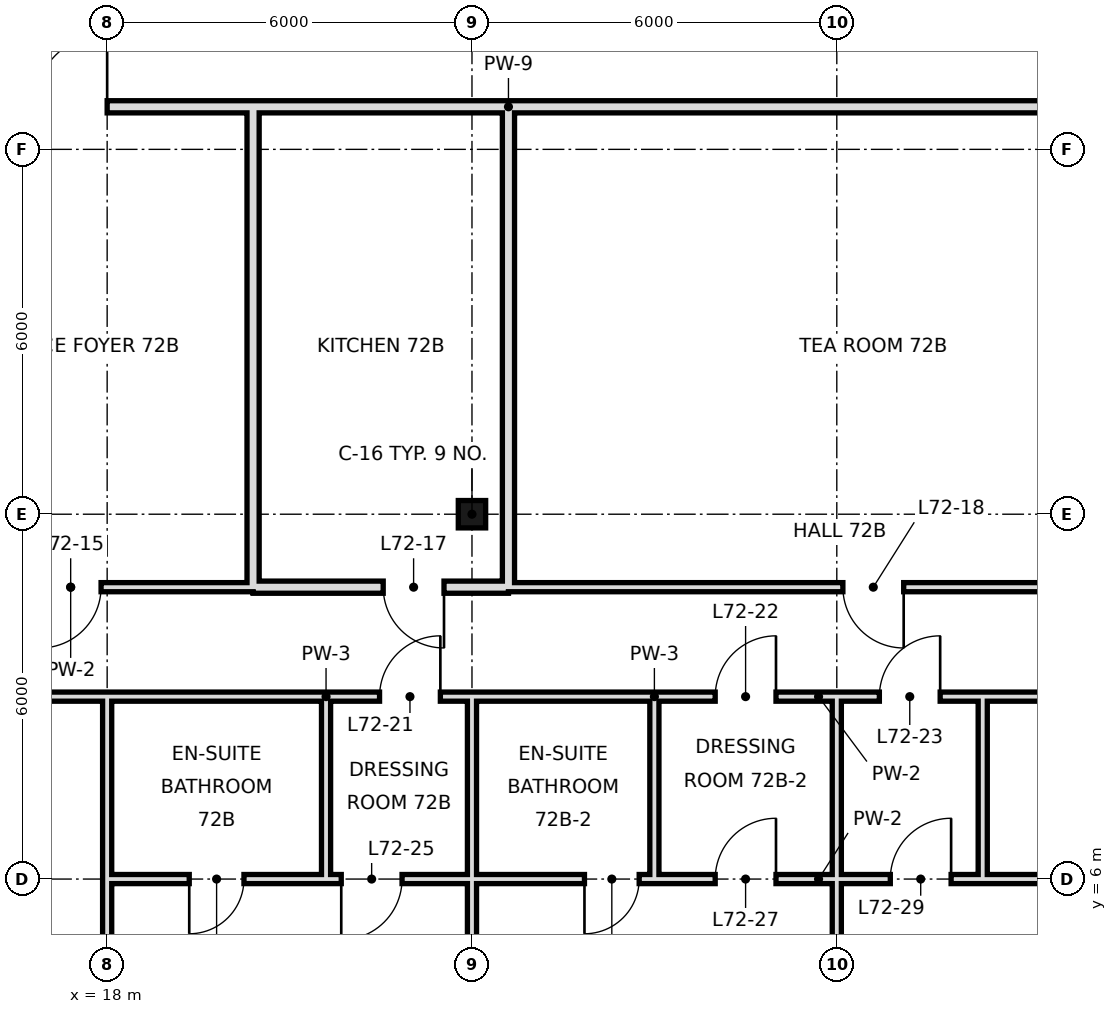
"""IFC4 building model, lengths in metres.
Left out: names, types, materials, properties, quantities, classifications, styles, units other than length and angle.
Written with IfcOpenShell. Run it as: python <this file> out.ifc"""

import sys

from ifc_helpers import new_model, si_unit, direction, frame, frame_2d, origin, origin_2d, place, context, subcontext, project, spatial, rectangle, hollow_rectangle, extrude, element, fill, save


model = new_model("IFC4")
c1 = context("Model", 3, precision=1e-05, world=origin(), true_north=direction((0.0, 1.0)))
c2 = subcontext(c1, "Body", "Model", "MODEL_VIEW")
j1 = project(units=[si_unit("LENGTHUNIT", "METRE"), si_unit("PLANEANGLEUNIT", "RADIAN")], contexts=[c1])
p1 = place(None, origin())
s1 = spatial("IfcSite", under=j1, at=p1, CompositionType="ELEMENT")
p2 = place(p1, origin())
s2 = spatial("IfcBuilding", under=s1, at=p2, CompositionType="ELEMENT")
p3 = place(p2, frame((0.0, 0.0, 305.2)))
s3 = spatial("IfcBuildingStorey", under=s2, at=p3, CompositionType="ELEMENT", Elevation=305.2)
p4 = place(p3, frame((24.0, 12.0, 0.0), z_axis=(0.0, 0.0, 1.0), x_axis=(1.0, 0.0, 0.0)))
e1 = element("IfcColumn", 1, at=p4, inside=s3, PredefinedType="COLUMN", context=c2, shape_type="SweptSolid", body=[
    extrude(hollow_rectangle(XDim=0.45, YDim=0.45, WallThickness=0.022, at=origin_2d()), origin(), (0.0, 0.0, 1.0), 3.6),
])
p5 = place(p3, frame((18.0, -0.6, 0.0), z_axis=(0.0, 0.0, 1.0), x_axis=(0.0, 1.0, 0.0)))
e2 = element("IfcWall", 2, at=p5, inside=s3, PredefinedType="PARTITIONING", context=c2, shape_type="SweptSolid", body=[
    extrude(rectangle(XDim=6.6, YDim=0.15, at=frame_2d((3.3, 0.0))), origin(), (0.0, 0.0, 1.0), 2.72),
])
p6 = place(p3, frame((18.0, 6.0, 0.0), z_axis=(0.0, 0.0, 1.0), x_axis=(0.0, 1.0, 0.0)))
e3 = element("IfcWall", 3, at=p6, inside=s3, PredefinedType="PARTITIONING", context=c2, shape_type="SweptSolid", body=[
    extrude(rectangle(XDim=3.0, YDim=0.15, at=frame_2d((1.5, 0.0))), origin(), (0.0, 0.0, 1.0), 2.72),
])
p7 = place(p3, frame((20.4, 10.8, 0.0), z_axis=(0.0, 0.0, 1.0), x_axis=(0.0, 1.0, 0.0)))
e4 = element("IfcWall", 4, at=p7, inside=s3, PredefinedType="SOLIDWALL", context=c2, shape_type="SweptSolid", body=[
    extrude(rectangle(XDim=7.9, YDim=0.2, at=frame_2d((3.95, 0.0))), origin(), (0.0, 0.0, 1.0), 2.72),
])
p8 = place(p3, frame((21.6, 6.0, 0.0), z_axis=(0.0, 0.0, 1.0), x_axis=(0.0, 1.0, 0.0)))
e5 = element("IfcWall", 5, at=p8, inside=s3, PredefinedType="PARTITIONING", context=c2, shape_type="SweptSolid", body=[
    extrude(rectangle(XDim=3.0, YDim=0.15, at=frame_2d((1.5, 0.0))), origin(), (0.0, 0.0, 1.0), 3.42),
])
p9 = place(p3, frame((24.0, 0.0, 0.0), z_axis=(0.0, 0.0, 1.0), x_axis=(0.0, 1.0, 0.0)))
e6 = element("IfcWall", 6, at=p9, inside=s3, PredefinedType="PARTITIONING", context=c2, shape_type="SweptSolid", body=[
    extrude(rectangle(XDim=6.0, YDim=0.15, at=frame_2d((3.0, 0.0))), origin(), (0.0, 0.0, 1.0), 2.72),
])
p10 = place(p3, frame((24.0, 6.0, 0.0), z_axis=(0.0, 0.0, 1.0), x_axis=(0.0, 1.0, 0.0)))
e7 = element("IfcWall", 7, at=p10, inside=s3, PredefinedType="PARTITIONING", context=c2, shape_type="SweptSolid", body=[
    extrude(rectangle(XDim=3.0, YDim=0.15, at=frame_2d((1.5, 0.0))), origin(), (0.0, 0.0, 1.0), 2.72),
])
p11 = place(p3, frame((24.6, 10.8, 0.0), z_axis=(0.0, 0.0, 1.0), x_axis=(0.0, 1.0, 0.0)))
e8 = element("IfcWall", 8, at=p11, inside=s3, PredefinedType="SOLIDWALL", context=c2, shape_type="SweptSolid", body=[
    extrude(rectangle(XDim=7.9, YDim=0.2, at=frame_2d((3.95, 0.0))), origin(), (0.0, 0.0, 1.0), 2.72),
])
p12 = place(p3, frame((27.0, 6.0, 0.0), z_axis=(0.0, 0.0, 1.0), x_axis=(0.0, 1.0, 0.0)))
e9 = element("IfcWall", 9, at=p12, inside=s3, PredefinedType="PARTITIONING", context=c2, shape_type="SweptSolid", body=[
    extrude(rectangle(XDim=3.0, YDim=0.15, at=frame_2d((1.5, 0.0))), origin(), (0.0, 0.0, 1.0), 3.42),
])
p13 = place(p3, frame((30.0, -0.6, 0.0), z_axis=(0.0, 0.0, 1.0), x_axis=(0.0, 1.0, 0.0)))
e10 = element("IfcWall", 10, at=p13, inside=s3, PredefinedType="PARTITIONING", context=c2, shape_type="SweptSolid", body=[
    extrude(rectangle(XDim=9.6, YDim=0.15, at=frame_2d((4.8, 0.0))), origin(), (0.0, 0.0, 1.0), 2.72),
])
p14 = place(p3, frame((32.4, 6.0, 0.0), z_axis=(0.0, 0.0, 1.0), x_axis=(0.0, 1.0, 0.0)))
e11 = element("IfcWall", 11, at=p14, inside=s3, PredefinedType="PARTITIONING", context=c2, shape_type="SweptSolid", body=[
    extrude(rectangle(XDim=3.0, YDim=0.15, at=frame_2d((1.5, 0.0))), origin(), (0.0, 0.0, 1.0), 3.42),
])
p15 = place(p3, frame((20.4, 10.8, 0.0), z_axis=(0.0, 0.0, 1.0), x_axis=(1.0, 0.0, 0.0)))
e12 = element("IfcWall", 12, at=p15, inside=s3, PredefinedType="SOLIDWALL", context=c2, shape_type="SweptSolid", body=[
    extrude(rectangle(XDim=4.2, YDim=0.2, at=frame_2d((2.1, 0.0))), origin(), (0.0, 0.0, 1.0), 2.72),
])
p16 = place(p15, frame((2.14, 0.0, 0.0)))
e13 = element("IfcOpeningElement", 13, at=p16, cuts=e12, PredefinedType="OPENING", context=c2, shape_type="SweptSolid", body=[
    extrude(rectangle(XDim=1.0, YDim=2.4, at=frame_2d((0.5, 1.2))), frame((0.0, 0.11, 0.0), z_axis=(0.0, -1.0, 0.0), x_axis=(1.0, 0.0, 0.0)), (0.0, 0.0, 1.0), 0.22),
])
p17 = place(p3, frame((14.4, 10.8, 0.0), z_axis=(0.0, 0.0, 1.0), x_axis=(1.0, 0.0, 0.0)))
e14 = element("IfcWall", 14, at=p17, inside=s3, PredefinedType="PARTITIONING", context=c2, shape_type="SweptSolid", body=[
    extrude(rectangle(XDim=6.0, YDim=0.15, at=frame_2d((3.0, 0.0))), origin(), (0.0, 0.0, 1.0), 3.42),
])
p18 = place(p17, frame((2.5, 0.0, 0.0)))
e15 = element("IfcOpeningElement", 15, at=p18, cuts=e14, PredefinedType="OPENING", context=c2, shape_type="SweptSolid", body=[
    extrude(rectangle(XDim=1.0, YDim=2.4, at=frame_2d((0.5, 1.2))), frame((0.0, 0.085, 0.0), z_axis=(0.0, -1.0, 0.0), x_axis=(1.0, 0.0, 0.0)), (0.0, 0.0, 1.0), 0.17),
])
p19 = place(p3, frame((24.6, 10.8, 0.0), z_axis=(0.0, 0.0, 1.0), x_axis=(1.0, 0.0, 0.0)))
e16 = element("IfcWall", 16, at=p19, inside=s3, PredefinedType="PARTITIONING", context=c2, shape_type="SweptSolid", body=[
    extrude(rectangle(XDim=24.0, YDim=0.15, at=frame_2d((12.0, 0.0))), origin(), (0.0, 0.0, 1.0), 3.42),
])
p20 = place(p19, frame((5.5, 0.0, 0.0)))
e17 = element("IfcOpeningElement", 17, at=p20, cuts=e16, PredefinedType="OPENING", context=c2, shape_type="SweptSolid", body=[
    extrude(rectangle(XDim=1.0, YDim=2.4, at=frame_2d((0.5, 1.2))), frame((0.0, 0.085, 0.0), z_axis=(0.0, -1.0, 0.0), x_axis=(1.0, 0.0, 0.0)), (0.0, 0.0, 1.0), 0.17),
])
p21 = place(p19, frame((15.22, 0.0, 0.0)))
e18 = element("IfcOpeningElement", 18, at=p21, cuts=e16, PredefinedType="OPENING", context=c2, shape_type="SweptSolid", body=[
    extrude(rectangle(XDim=1.0, YDim=2.4, at=frame_2d((0.5, 1.2))), frame((0.0, 0.085, 0.0), z_axis=(0.0, -1.0, 0.0), x_axis=(1.0, 0.0, 0.0)), (0.0, 0.0, 1.0), 0.17),
])
p22 = place(p3, frame((3.1, 18.7, 0.0), z_axis=(0.0, 0.0, 1.0), x_axis=(1.0, 0.0, 0.0)))
e19 = element("IfcWall", 19, at=p22, inside=s3, PredefinedType="SOLIDWALL", context=c2, shape_type="SweptSolid", body=[
    extrude(rectangle(XDim=17.3, YDim=0.2, at=frame_2d((8.65, 0.0))), origin(), (0.0, 0.0, 1.0), 2.72),
])
p23 = place(p22, frame((6.12, 0.0, 0.0)))
e20 = element("IfcOpeningElement", 20, at=p23, cuts=e19, PredefinedType="OPENING", context=c2, shape_type="SweptSolid", body=[
    extrude(rectangle(XDim=1.2, YDim=2.4, at=frame_2d((0.6, 1.2))), frame((0.0, 0.11, 0.0), z_axis=(0.0, -1.0, 0.0), x_axis=(1.0, 0.0, 0.0)), (0.0, 0.0, 1.0), 0.22),
])
p24 = place(p22, frame((13.7, 0.0, 0.0)))
e21 = element("IfcOpeningElement", 21, at=p24, cuts=e19, PredefinedType="OPENING", context=c2, shape_type="SweptSolid", body=[
    extrude(rectangle(XDim=1.2, YDim=2.4, at=frame_2d((0.6, 1.2))), frame((0.0, 0.11, 0.0), z_axis=(0.0, -1.0, 0.0), x_axis=(1.0, 0.0, 0.0)), (0.0, 0.0, 1.0), 0.22),
])
p25 = place(p3, frame((24.6, 18.7, 0.0), z_axis=(0.0, 0.0, 1.0), x_axis=(1.0, 0.0, 0.0)))
e22 = element("IfcWall", 22, at=p25, inside=s3, PredefinedType="SOLIDWALL", context=c2, shape_type="SweptSolid", body=[
    extrude(rectangle(XDim=20.3, YDim=0.2, at=frame_2d((10.15, 0.0))), origin(), (0.0, 0.0, 1.0), 2.72),
])
p26 = place(p3, frame((20.4, 18.7, 0.0), z_axis=(0.0, 0.0, 1.0), x_axis=(1.0, 0.0, 0.0)))
e23 = element("IfcWall", 23, at=p26, inside=s3, PredefinedType="SOLIDWALL", context=c2, shape_type="SweptSolid", body=[
    extrude(rectangle(XDim=4.2, YDim=0.2, at=frame_2d((2.1, 0.0))), origin(), (0.0, 0.0, 1.0), 3.42),
])
p27 = place(p3, frame((21.6, 6.0, 0.0), z_axis=(0.0, 0.0, 1.0), x_axis=(1.0, 0.0, 0.0)))
e24 = element("IfcWall", 24, at=p27, inside=s3, PredefinedType="PARTITIONING", context=c2, shape_type="SweptSolid", body=[
    extrude(rectangle(XDim=2.4, YDim=0.15, at=frame_2d((1.2, 0.0))), origin(), (0.0, 0.0, 1.0), 2.97),
])
p28 = place(p27, frame((0.25, 0.0, 0.0)))
e25 = element("IfcOpeningElement", 25, at=p28, cuts=e24, PredefinedType="OPENING", context=c2, shape_type="SweptSolid", body=[
    extrude(rectangle(XDim=1.0, YDim=2.4, at=frame_2d((0.5, 1.2))), frame((0.0, 0.085, 0.0), z_axis=(0.0, -1.0, 0.0), x_axis=(1.0, 0.0, 0.0)), (0.0, 0.0, 1.0), 0.17),
])
p29 = place(p3, frame((27.0, 6.0, 0.0), z_axis=(0.0, 0.0, 1.0), x_axis=(1.0, 0.0, 0.0)))
e26 = element("IfcWall", 26, at=p29, inside=s3, PredefinedType="PARTITIONING", context=c2, shape_type="SweptSolid", body=[
    extrude(rectangle(XDim=5.4, YDim=0.15, at=frame_2d((2.7, 0.0))), origin(), (0.0, 0.0, 1.0), 2.97),
])
p30 = place(p29, frame((1.0, 0.0, 0.0)))
e27 = element("IfcOpeningElement", 27, at=p30, cuts=e26, PredefinedType="OPENING", context=c2, shape_type="SweptSolid", body=[
    extrude(rectangle(XDim=1.0, YDim=2.4, at=frame_2d((0.5, 1.2))), frame((0.0, 0.085, 0.0), z_axis=(0.0, -1.0, 0.0), x_axis=(1.0, 0.0, 0.0)), (0.0, 0.0, 1.0), 0.17),
])
p31 = place(p29, frame((3.88, 0.0, 0.0)))
e28 = element("IfcOpeningElement", 28, at=p31, cuts=e26, PredefinedType="OPENING", context=c2, shape_type="SweptSolid", body=[
    extrude(rectangle(XDim=1.0, YDim=2.4, at=frame_2d((0.5, 1.2))), frame((0.0, 0.085, 0.0), z_axis=(0.0, -1.0, 0.0), x_axis=(1.0, 0.0, 0.0)), (0.0, 0.0, 1.0), 0.17),
])
p32 = place(p3, frame((18.0, 6.0, 0.0), z_axis=(0.0, 0.0, 1.0), x_axis=(1.0, 0.0, 0.0)))
e29 = element("IfcWall", 29, at=p32, inside=s3, PredefinedType="PARTITIONING", context=c2, shape_type="SweptSolid", body=[
    extrude(rectangle(XDim=3.6, YDim=0.15, at=frame_2d((1.8, 0.0))), origin(), (0.0, 0.0, 1.0), 2.97),
])
p33 = place(p32, frame((1.35, 0.0, 0.0)))
e30 = element("IfcOpeningElement", 30, at=p33, cuts=e29, PredefinedType="OPENING", context=c2, shape_type="SweptSolid", body=[
    extrude(rectangle(XDim=0.9, YDim=2.4, at=frame_2d((0.45, 1.2))), frame((0.0, 0.085, 0.0), z_axis=(0.0, -1.0, 0.0), x_axis=(1.0, 0.0, 0.0)), (0.0, 0.0, 1.0), 0.17),
])
p34 = place(p3, frame((24.0, 6.0, 0.0), z_axis=(0.0, 0.0, 1.0), x_axis=(1.0, 0.0, 0.0)))
e31 = element("IfcWall", 31, at=p34, inside=s3, PredefinedType="PARTITIONING", context=c2, shape_type="SweptSolid", body=[
    extrude(rectangle(XDim=3.0, YDim=0.15, at=frame_2d((1.5, 0.0))), origin(), (0.0, 0.0, 1.0), 2.97),
])
p35 = place(p34, frame((1.85, 0.0, 0.0)))
e32 = element("IfcOpeningElement", 32, at=p35, cuts=e31, PredefinedType="OPENING", context=c2, shape_type="SweptSolid", body=[
    extrude(rectangle(XDim=0.9, YDim=2.4, at=frame_2d((0.45, 1.2))), frame((0.0, 0.085, 0.0), z_axis=(0.0, -1.0, 0.0), x_axis=(1.0, 0.0, 0.0)), (0.0, 0.0, 1.0), 0.17),
])
p36 = place(p3, frame((32.4, 6.0, 0.0), z_axis=(0.0, 0.0, 1.0), x_axis=(1.0, 0.0, 0.0)))
e33 = element("IfcWall", 33, at=p36, inside=s3, PredefinedType="PARTITIONING", context=c2, shape_type="SweptSolid", body=[
    extrude(rectangle(XDim=3.6, YDim=0.15, at=frame_2d((1.8, 0.0))), origin(), (0.0, 0.0, 1.0), 2.97),
])
p37 = place(p36, frame((1.79, 0.0, 0.0)))
e34 = element("IfcOpeningElement", 34, at=p37, cuts=e33, PredefinedType="OPENING", context=c2, shape_type="SweptSolid", body=[
    extrude(rectangle(XDim=0.9, YDim=2.4, at=frame_2d((0.45, 1.2))), frame((0.0, 0.085, 0.0), z_axis=(0.0, -1.0, 0.0), x_axis=(1.0, 0.0, 0.0)), (0.0, 0.0, 1.0), 0.17),
])
p38 = place(p3, frame((8.4, 9.0, 0.0), z_axis=(0.0, 0.0, 1.0), x_axis=(1.0, 0.0, 0.0)))
e35 = element("IfcWall", 35, at=p38, inside=s3, PredefinedType="PARTITIONING", context=c2, shape_type="SweptSolid", body=[
    extrude(rectangle(XDim=9.6, YDim=0.15, at=frame_2d((4.8, 0.0))), origin(), (0.0, 0.0, 1.0), 3.42),
])
p39 = place(p38, frame((1.72, 0.0, 0.0)))
e36 = element("IfcOpeningElement", 36, at=p39, cuts=e35, PredefinedType="OPENING", context=c2, shape_type="SweptSolid", body=[
    extrude(rectangle(XDim=1.0, YDim=2.4, at=frame_2d((0.5, 1.2))), frame((0.0, 0.085, 0.0), z_axis=(0.0, -1.0, 0.0), x_axis=(1.0, 0.0, 0.0)), (0.0, 0.0, 1.0), 0.17),
])
p40 = place(p38, frame((5.2, 0.0, 0.0)))
e37 = element("IfcOpeningElement", 37, at=p40, cuts=e35, PredefinedType="OPENING", context=c2, shape_type="SweptSolid", body=[
    extrude(rectangle(XDim=1.0, YDim=2.4, at=frame_2d((0.5, 1.2))), frame((0.0, 0.085, 0.0), z_axis=(0.0, -1.0, 0.0), x_axis=(1.0, 0.0, 0.0)), (0.0, 0.0, 1.0), 0.17),
])
p41 = place(p3, frame((21.6, 9.0, 0.0), z_axis=(0.0, 0.0, 1.0), x_axis=(1.0, 0.0, 0.0)))
e38 = element("IfcWall", 38, at=p41, inside=s3, PredefinedType="PARTITIONING", context=c2, shape_type="SweptSolid", body=[
    extrude(rectangle(XDim=2.4, YDim=0.15, at=frame_2d((1.2, 0.0))), origin(), (0.0, 0.0, 1.0), 3.42),
])
p42 = place(p41, frame((0.88, 0.0, 0.0)))
e39 = element("IfcOpeningElement", 39, at=p42, cuts=e38, PredefinedType="OPENING", context=c2, shape_type="SweptSolid", body=[
    extrude(rectangle(XDim=1.0, YDim=2.4, at=frame_2d((0.5, 1.2))), frame((0.0, 0.085, 0.0), z_axis=(0.0, -1.0, 0.0), x_axis=(1.0, 0.0, 0.0)), (0.0, 0.0, 1.0), 0.17),
])
p43 = place(p3, frame((27.0, 9.0, 0.0), z_axis=(0.0, 0.0, 1.0), x_axis=(1.0, 0.0, 0.0)))
e40 = element("IfcWall", 40, at=p43, inside=s3, PredefinedType="PARTITIONING", context=c2, shape_type="SweptSolid", body=[
    extrude(rectangle(XDim=5.4, YDim=0.15, at=frame_2d((2.7, 0.0))), origin(), (0.0, 0.0, 1.0), 3.42),
])
p44 = place(p43, frame((1.0, 0.0, 0.0)))
e41 = element("IfcOpeningElement", 41, at=p44, cuts=e40, PredefinedType="OPENING", context=c2, shape_type="SweptSolid", body=[
    extrude(rectangle(XDim=1.0, YDim=2.4, at=frame_2d((0.5, 1.2))), frame((0.0, 0.085, 0.0), z_axis=(0.0, -1.0, 0.0), x_axis=(1.0, 0.0, 0.0)), (0.0, 0.0, 1.0), 0.17),
])
p45 = place(p43, frame((3.7, 0.0, 0.0)))
e42 = element("IfcOpeningElement", 42, at=p45, cuts=e40, PredefinedType="OPENING", context=c2, shape_type="SweptSolid", body=[
    extrude(rectangle(XDim=1.0, YDim=2.4, at=frame_2d((0.5, 1.2))), frame((0.0, 0.085, 0.0), z_axis=(0.0, -1.0, 0.0), x_axis=(1.0, 0.0, 0.0)), (0.0, 0.0, 1.0), 0.17),
])
p46 = place(p3, frame((18.0, 9.0, 0.0), z_axis=(0.0, 0.0, 1.0), x_axis=(1.0, 0.0, 0.0)))
e43 = element("IfcWall", 43, at=p46, inside=s3, PredefinedType="PARTITIONING", context=c2, shape_type="SweptSolid", body=[
    extrude(rectangle(XDim=3.6, YDim=0.15, at=frame_2d((1.8, 0.0))), origin(), (0.0, 0.0, 1.0), 3.42),
])
p47 = place(p3, frame((24.0, 9.0, 0.0), z_axis=(0.0, 0.0, 1.0), x_axis=(1.0, 0.0, 0.0)))
e44 = element("IfcWall", 44, at=p47, inside=s3, PredefinedType="PARTITIONING", context=c2, shape_type="SweptSolid", body=[
    extrude(rectangle(XDim=3.0, YDim=0.15, at=frame_2d((1.5, 0.0))), origin(), (0.0, 0.0, 1.0), 3.42),
])
p48 = place(p3, frame((32.4, 9.0, 0.0), z_axis=(0.0, 0.0, 1.0), x_axis=(1.0, 0.0, 0.0)))
e45 = element("IfcWall", 45, at=p48, inside=s3, PredefinedType="PARTITIONING", context=c2, shape_type="SweptSolid", body=[
    extrude(rectangle(XDim=3.6, YDim=0.15, at=frame_2d((1.8, 0.0))), origin(), (0.0, 0.0, 1.0), 3.42),
])
p49 = place(p18, frame((1.0, 0.0, 0.0), z_axis=(0.0, 0.0, 1.0), x_axis=(-1.0, 0.0, 0.0)))
e46 = element("IfcDoor", 46, at=p49, inside=s3, OperationType="SINGLE_SWING_RIGHT", PredefinedType="DOOR", context=c2, shape_type="SweptSolid", body=[
    extrude(rectangle(XDim=1.0, YDim=2.4, at=frame_2d((0.5, 1.2))), frame((0.0, 0.025, 0.0), z_axis=(0.0, -1.0, 0.0), x_axis=(1.0, 0.0, 0.0)), (0.0, 0.0, 1.0), 0.05),
])
fill(e15, e46)
p50 = place(p16, origin())
e47 = element("IfcDoor", 47, at=p50, inside=s3, OperationType="SINGLE_SWING_RIGHT", PredefinedType="DOOR", context=c2, shape_type="SweptSolid", body=[
    extrude(rectangle(XDim=1.0, YDim=2.4, at=frame_2d((0.5, 1.2))), frame((0.0, 0.025, 0.0), z_axis=(0.0, -1.0, 0.0), x_axis=(1.0, 0.0, 0.0)), (0.0, 0.0, 1.0), 0.05),
])
fill(e13, e47)
p51 = place(p20, origin())
e48 = element("IfcDoor", 48, at=p51, inside=s3, OperationType="SINGLE_SWING_RIGHT", PredefinedType="DOOR", context=c2, shape_type="SweptSolid", body=[
    extrude(rectangle(XDim=1.0, YDim=2.4, at=frame_2d((0.5, 1.2))), frame((0.0, 0.025, 0.0), z_axis=(0.0, -1.0, 0.0), x_axis=(1.0, 0.0, 0.0)), (0.0, 0.0, 1.0), 0.05),
])
fill(e17, e48)
p52 = place(p42, frame((1.0, 0.0, 0.0), z_axis=(0.0, 0.0, 1.0), x_axis=(-1.0, 0.0, 0.0)))
e49 = element("IfcDoor", 49, at=p52, inside=s3, OperationType="SINGLE_SWING_LEFT", PredefinedType="DOOR", context=c2, shape_type="SweptSolid", body=[
    extrude(rectangle(XDim=1.0, YDim=2.4, at=frame_2d((0.5, 1.2))), frame((0.0, 0.025, 0.0), z_axis=(0.0, -1.0, 0.0), x_axis=(1.0, 0.0, 0.0)), (0.0, 0.0, 1.0), 0.05),
])
fill(e39, e49)
p53 = place(p44, frame((1.0, 0.0, 0.0), z_axis=(0.0, 0.0, 1.0), x_axis=(-1.0, 0.0, 0.0)))
e50 = element("IfcDoor", 50, at=p53, inside=s3, OperationType="SINGLE_SWING_LEFT", PredefinedType="DOOR", context=c2, shape_type="SweptSolid", body=[
    extrude(rectangle(XDim=1.0, YDim=2.4, at=frame_2d((0.5, 1.2))), frame((0.0, 0.025, 0.0), z_axis=(0.0, -1.0, 0.0), x_axis=(1.0, 0.0, 0.0)), (0.0, 0.0, 1.0), 0.05),
])
fill(e41, e50)
p54 = place(p45, frame((1.0, 0.0, 0.0), z_axis=(0.0, 0.0, 1.0), x_axis=(-1.0, 0.0, 0.0)))
e51 = element("IfcDoor", 51, at=p54, inside=s3, OperationType="SINGLE_SWING_LEFT", PredefinedType="DOOR", context=c2, shape_type="SweptSolid", body=[
    extrude(rectangle(XDim=1.0, YDim=2.4, at=frame_2d((0.5, 1.2))), frame((0.0, 0.025, 0.0), z_axis=(0.0, -1.0, 0.0), x_axis=(1.0, 0.0, 0.0)), (0.0, 0.0, 1.0), 0.05),
])
fill(e42, e51)
p55 = place(p28, frame((1.0, 0.0, 0.0), z_axis=(0.0, 0.0, 1.0), x_axis=(-1.0, 0.0, 0.0)))
e52 = element("IfcDoor", 52, at=p55, inside=s3, OperationType="SINGLE_SWING_RIGHT", PredefinedType="DOOR", context=c2, shape_type="SweptSolid", body=[
    extrude(rectangle(XDim=1.0, YDim=2.4, at=frame_2d((0.5, 1.2))), frame((0.0, 0.025, 0.0), z_axis=(0.0, -1.0, 0.0), x_axis=(1.0, 0.0, 0.0)), (0.0, 0.0, 1.0), 0.05),
])
fill(e25, e52)
p56 = place(p33, frame((0.9, 0.0, 0.0), z_axis=(0.0, 0.0, 1.0), x_axis=(-1.0, 0.0, 0.0)))
e53 = element("IfcDoor", 53, at=p56, inside=s3, OperationType="SINGLE_SWING_RIGHT", PredefinedType="DOOR", context=c2, shape_type="SweptSolid", body=[
    extrude(rectangle(XDim=0.9, YDim=2.4, at=frame_2d((0.45, 1.2))), frame((0.0, 0.025, 0.0), z_axis=(0.0, -1.0, 0.0), x_axis=(1.0, 0.0, 0.0)), (0.0, 0.0, 1.0), 0.05),
])
fill(e30, e53)
p57 = place(p30, frame((1.0, 0.0, 0.0), z_axis=(0.0, 0.0, 1.0), x_axis=(-1.0, 0.0, 0.0)))
e54 = element("IfcDoor", 54, at=p57, inside=s3, OperationType="SINGLE_SWING_LEFT", PredefinedType="DOOR", context=c2, shape_type="SweptSolid", body=[
    extrude(rectangle(XDim=1.0, YDim=2.4, at=frame_2d((0.5, 1.2))), frame((0.0, 0.025, 0.0), z_axis=(0.0, -1.0, 0.0), x_axis=(1.0, 0.0, 0.0)), (0.0, 0.0, 1.0), 0.05),
])
fill(e27, e54)
p58 = place(p35, frame((0.9, 0.0, 0.0), z_axis=(0.0, 0.0, 1.0), x_axis=(-1.0, 0.0, 0.0)))
e55 = element("IfcDoor", 55, at=p58, inside=s3, OperationType="SINGLE_SWING_RIGHT", PredefinedType="DOOR", context=c2, shape_type="SweptSolid", body=[
    extrude(rectangle(XDim=0.9, YDim=2.4, at=frame_2d((0.45, 1.2))), frame((0.0, 0.025, 0.0), z_axis=(0.0, -1.0, 0.0), x_axis=(1.0, 0.0, 0.0)), (0.0, 0.0, 1.0), 0.05),
])
fill(e32, e55)
p59 = place(p31, frame((1.0, 0.0, 0.0), z_axis=(0.0, 0.0, 1.0), x_axis=(-1.0, 0.0, 0.0)))
e56 = element("IfcDoor", 56, at=p59, inside=s3, OperationType="SINGLE_SWING_LEFT", PredefinedType="DOOR", context=c2, shape_type="SweptSolid", body=[
    extrude(rectangle(XDim=1.0, YDim=2.4, at=frame_2d((0.5, 1.2))), frame((0.0, 0.025, 0.0), z_axis=(0.0, -1.0, 0.0), x_axis=(1.0, 0.0, 0.0)), (0.0, 0.0, 1.0), 0.05),
])
fill(e28, e56)
p60 = place(p24, frame((1.2, 0.0, 0.0), z_axis=(0.0, 0.0, 1.0), x_axis=(-1.0, 0.0, 0.0)))
e57 = element("IfcDoor", 57, at=p60, inside=s3, OperationType="SINGLE_SWING_LEFT", PredefinedType="DOOR", context=c2, shape_type="SweptSolid", body=[
    extrude(rectangle(XDim=1.2, YDim=2.4, at=frame_2d((0.6, 1.2))), frame((0.0, 0.025, 0.0), z_axis=(0.0, -1.0, 0.0), x_axis=(1.0, 0.0, 0.0)), (0.0, 0.0, 1.0), 0.05),
])
fill(e21, e57)
save(model, sys.argv[1])
